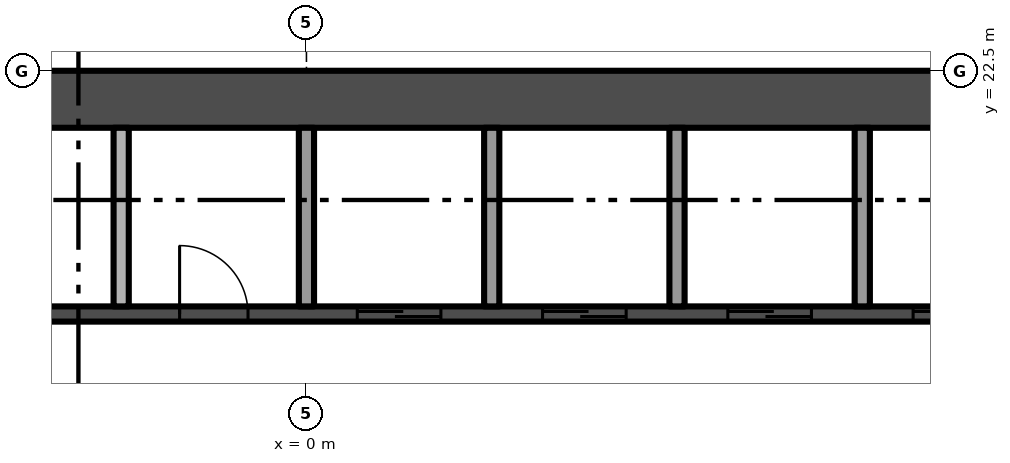
"""IFC4 building model, lengths in metres.
Left out: names, types, materials, properties, quantities, classifications, styles, units other than length and angle.
Written with IfcOpenShell. Run it as: python <this file> out.ifc"""

import sys

from ifc_helpers import new_model, si_unit, direction, frame, frame_2d, origin, place, context, subcontext, project, spatial, rectangle, extrude, element, fill, save


model = new_model("IFC4")
c1 = context("Model", 3, precision=1e-05, world=origin(), true_north=direction((0.0, 1.0)))
c2 = subcontext(c1, "Body", "Model", "MODEL_VIEW")
j1 = project(units=[si_unit("LENGTHUNIT", "METRE"), si_unit("PLANEANGLEUNIT", "RADIAN")], contexts=[c1])
p1 = place(None, origin())
s1 = spatial("IfcSite", under=j1, at=p1, CompositionType="ELEMENT")
p2 = place(p1, origin())
s2 = spatial("IfcBuilding", under=s1, at=p2, CompositionType="ELEMENT")
p3 = place(p2, frame((0.0, 0.0, 128.8)))
s3 = spatial("IfcBuildingStorey", under=s2, at=p3, CompositionType="ELEMENT", Elevation=128.8)
p4 = place(p3, frame((13.5, 22.125, -0.3), z_axis=(0.0, 0.0, 1.0), x_axis=(-1.0, 0.0, 0.0)))
e1 = element("IfcWall", 1, at=p4, inside=s3, PredefinedType="SHEAR", context=c2, shape_type="SweptSolid", body=[
    extrude(rectangle(XDim=27.0, YDim=0.75, at=frame_2d((13.5, 0.0))), origin(), (0.0, 0.0, 1.0), 3.8),
])
p5 = place(p3, frame((-9.85, 19.3, 0.0), z_axis=(0.0, 0.0, 1.0), x_axis=(1.0, 0.0, 0.0)))
e2 = element("IfcWall", 2, at=p5, inside=s3, PredefinedType="SHEAR", context=c2, shape_type="SweptSolid", body=[
    extrude(rectangle(XDim=19.7, YDim=0.2, at=frame_2d((9.85, 0.0))), origin(), (0.0, 0.0, 1.0), 3.5),
])
p6 = place(p5, frame((10.519, 0.0, 0.0)))
e3 = element("IfcOpeningElement", 3, at=p6, cuts=e2, PredefinedType="OPENING", context=c2, shape_type="SweptSolid", body=[
    extrude(rectangle(XDim=1.1, YDim=2.1, at=frame_2d((0.55, 1.05))), frame((0.0, 0.11, 0.0), z_axis=(0.0, -1.0, 0.0), x_axis=(1.0, 0.0, 0.0)), (0.0, 0.0, 1.0), 0.22),
])
p7 = place(p5, frame((12.956, 0.0, 0.0)))
e4 = element("IfcOpeningElement", 4, at=p7, cuts=e2, PredefinedType="OPENING", context=c2, shape_type="SweptSolid", body=[
    extrude(rectangle(XDim=1.1, YDim=2.1, at=frame_2d((0.55, 1.05))), frame((0.0, 0.11, 0.0), z_axis=(0.0, -1.0, 0.0), x_axis=(1.0, 0.0, 0.0)), (0.0, 0.0, 1.0), 0.22),
])
p8 = place(p5, frame((15.394, 0.0, 0.0)))
e5 = element("IfcOpeningElement", 5, at=p8, cuts=e2, PredefinedType="OPENING", context=c2, shape_type="SweptSolid", body=[
    extrude(rectangle(XDim=1.1, YDim=2.1, at=frame_2d((0.55, 1.05))), frame((0.0, 0.11, 0.0), z_axis=(0.0, -1.0, 0.0), x_axis=(1.0, 0.0, 0.0)), (0.0, 0.0, 1.0), 0.22),
])
p9 = place(p5, frame((17.831, 0.0, 0.0)))
e6 = element("IfcOpeningElement", 6, at=p9, cuts=e2, PredefinedType="OPENING", context=c2, shape_type="SweptSolid", body=[
    extrude(rectangle(XDim=1.1, YDim=2.1, at=frame_2d((0.55, 1.05))), frame((0.0, 0.11, 0.0), z_axis=(0.0, -1.0, 0.0), x_axis=(1.0, 0.0, 0.0)), (0.0, 0.0, 1.0), 0.22),
])
p10 = place(p5, frame((3.306, 0.0, 0.0)))
e7 = element("IfcOpeningElement", 7, at=p10, cuts=e2, PredefinedType="OPENING", context=c2, shape_type="SweptSolid", body=[
    extrude(rectangle(XDim=0.9, YDim=2.1, at=frame_2d((0.45, 1.05))), frame((0.0, 0.11, 0.0), z_axis=(0.0, -1.0, 0.0), x_axis=(1.0, 0.0, 0.0)), (0.0, 0.0, 1.0), 0.22),
])
p11 = place(p5, frame((8.181, 0.0, 0.0)))
e8 = element("IfcOpeningElement", 8, at=p11, cuts=e2, PredefinedType="OPENING", context=c2, shape_type="SweptSolid", body=[
    extrude(rectangle(XDim=0.9, YDim=2.1, at=frame_2d((0.45, 1.05))), frame((0.0, 0.11, 0.0), z_axis=(0.0, -1.0, 0.0), x_axis=(1.0, 0.0, 0.0)), (0.0, 0.0, 1.0), 0.22),
])
for number, where, z_axis, x_axis in (
    (9, (-2.438, 19.4, 0.0), (0.0, 0.0, 1.0), (0.0, 1.0, 0.0)),
    (10, (0.0, 19.4, 0.0), (0.0, 0.0, 1.0), (0.0, 1.0, 0.0)),
    (11, (2.438, 19.4, 0.0), (0.0, 0.0, 1.0), (0.0, 1.0, 0.0)),
    (12, (4.875, 19.4, 0.0), (0.0, 0.0, 1.0), (0.0, 1.0, 0.0)),
    (13, (7.312, 19.4, 0.0), (0.0, 0.0, 1.0), (0.0, 1.0, 0.0)),
):
    element("IfcWall", number, at=place(p3, frame(where, z_axis=z_axis, x_axis=x_axis)), inside=s3, PredefinedType="PARTITIONING", context=c2, shape_type="SweptSolid", body=[
        extrude(rectangle(XDim=2.35, YDim=0.2, at=frame_2d((1.175, 0.0))), origin(), (0.0, 0.0, 1.0), 3.5),
    ])
p12 = place(p6, origin())
e14 = element("IfcDoor", 14, at=p12, inside=s3, OperationType="SLIDING_TO_RIGHT", PredefinedType="DOOR", context=c2, shape_type="SweptSolid", body=[
    extrude(rectangle(XDim=1.1, YDim=2.1, at=frame_2d((0.55, 1.05))), frame((0.0, 0.025, 0.0), z_axis=(0.0, -1.0, 0.0), x_axis=(1.0, 0.0, 0.0)), (0.0, 0.0, 1.0), 0.05),
])
fill(e3, e14)
p13 = place(p7, origin())
e15 = element("IfcDoor", 15, at=p13, inside=s3, OperationType="SLIDING_TO_RIGHT", PredefinedType="DOOR", context=c2, shape_type="SweptSolid", body=[
    extrude(rectangle(XDim=1.1, YDim=2.1, at=frame_2d((0.55, 1.05))), frame((0.0, 0.025, 0.0), z_axis=(0.0, -1.0, 0.0), x_axis=(1.0, 0.0, 0.0)), (0.0, 0.0, 1.0), 0.05),
])
fill(e4, e15)
p14 = place(p8, origin())
e16 = element("IfcDoor", 16, at=p14, inside=s3, OperationType="SLIDING_TO_RIGHT", PredefinedType="DOOR", context=c2, shape_type="SweptSolid", body=[
    extrude(rectangle(XDim=1.1, YDim=2.1, at=frame_2d((0.55, 1.05))), frame((0.0, 0.025, 0.0), z_axis=(0.0, -1.0, 0.0), x_axis=(1.0, 0.0, 0.0)), (0.0, 0.0, 1.0), 0.05),
])
fill(e5, e16)
p15 = place(p9, origin())
e17 = element("IfcDoor", 17, at=p15, inside=s3, OperationType="SLIDING_TO_RIGHT", PredefinedType="DOOR", context=c2, shape_type="SweptSolid", body=[
    extrude(rectangle(XDim=1.1, YDim=2.1, at=frame_2d((0.55, 1.05))), frame((0.0, 0.025, 0.0), z_axis=(0.0, -1.0, 0.0), x_axis=(1.0, 0.0, 0.0)), (0.0, 0.0, 1.0), 0.05),
])
fill(e6, e17)
p16 = place(p11, origin())
e18 = element("IfcDoor", 18, at=p16, inside=s3, OperationType="SINGLE_SWING_LEFT", PredefinedType="DOOR", context=c2, shape_type="SweptSolid", body=[
    extrude(rectangle(XDim=0.9, YDim=2.1, at=frame_2d((0.45, 1.05))), frame((0.0, 0.025, 0.0), z_axis=(0.0, -1.0, 0.0), x_axis=(1.0, 0.0, 0.0)), (0.0, 0.0, 1.0), 0.05),
])
fill(e8, e18)
save(model, sys.argv[1])
